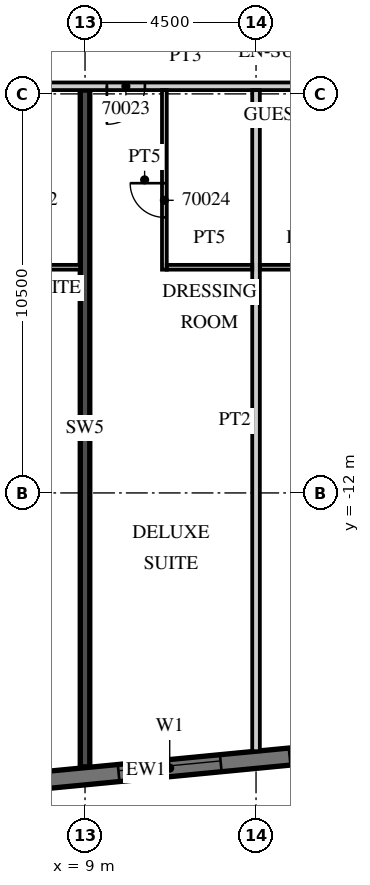
"""IFC4 building model, lengths in metres.
Left out: names, types, materials, properties, quantities, classifications, styles, units other than length and angle.
Written with IfcOpenShell. Run it as: python <this file> out.ifc"""

import sys

from ifc_helpers import new_model, si_unit, direction, frame, frame_2d, origin, place, context, subcontext, project, spatial, rectangle, extrude, element, fill, save


model = new_model("IFC4")
c1 = context("Model", 3, precision=1e-05, world=origin(), true_north=direction((0.0, 1.0)))
c2 = subcontext(c1, "Body", "Model", "MODEL_VIEW")
j1 = project(units=[si_unit("LENGTHUNIT", "METRE"), si_unit("PLANEANGLEUNIT", "RADIAN")], contexts=[c1])
p1 = place(None, origin())
s1 = spatial("IfcSite", under=j1, at=p1, CompositionType="ELEMENT")
p2 = place(p1, origin())
s2 = spatial("IfcBuilding", under=s1, at=p2, CompositionType="ELEMENT")
p3 = place(p2, frame((0.0, 0.0, 281.7)))
s3 = spatial("IfcBuildingStorey", under=s2, at=p3, CompositionType="ELEMENT", Elevation=281.7)
p4 = place(p3, frame((9.0, -19.207, 0.0), z_axis=(0.0, 0.0, 1.0), x_axis=(0.0, 1.0, 0.0)))
e1 = element("IfcWall", 1, at=p4, inside=s3, PredefinedType="SHEAR", context=c2, shape_type="SweptSolid", body=[
    extrude(rectangle(XDim=17.807, YDim=0.25, at=frame_2d((8.904, 0.0))), origin(), (0.0, 0.0, 1.0), 3.3),
])
p5 = place(p3, frame((-13.521, -21.624, 0.0), z_axis=(0.0, 0.0, 1.0), x_axis=(0.995396186218, 0.095845878695, 0.0)))
e2 = element("IfcWall", 2, at=p5, inside=s3, PredefinedType="SOLIDWALL", context=c2, shape_type="SweptSolid", body=[
    extrude(rectangle(XDim=48.481, YDim=0.45, at=frame_2d((24.241, 0.0))), origin(), (0.0, 0.0, 1.0), 3.02),
])
p6 = place(p5, frame((0.91, 0.0, 0.45)))
e3 = element("IfcOpeningElement", 3, at=p6, cuts=e2, PredefinedType="OPENING", context=c2, shape_type="SweptSolid", body=[
    extrude(rectangle(XDim=2.7, YDim=2.25, at=frame_2d((1.35, 1.125))), frame((0.0, 0.235, 0.0), z_axis=(0.0, -1.0, 0.0), x_axis=(1.0, 0.0, 0.0)), (0.0, 0.0, 1.0), 0.47),
])
p7 = place(p5, frame((5.431, 0.0, 0.45)))
e4 = element("IfcOpeningElement", 4, at=p7, cuts=e2, PredefinedType="OPENING", context=c2, shape_type="SweptSolid", body=[
    extrude(rectangle(XDim=2.7, YDim=2.25, at=frame_2d((1.35, 1.125))), frame((0.0, 0.235, 0.0), z_axis=(0.0, -1.0, 0.0), x_axis=(1.0, 0.0, 0.0)), (0.0, 0.0, 1.0), 0.47),
])
p8 = place(p5, frame((9.952, 0.0, 0.45)))
e5 = element("IfcOpeningElement", 5, at=p8, cuts=e2, PredefinedType="OPENING", context=c2, shape_type="SweptSolid", body=[
    extrude(rectangle(XDim=2.7, YDim=2.25, at=frame_2d((1.35, 1.125))), frame((0.0, 0.235, 0.0), z_axis=(0.0, -1.0, 0.0), x_axis=(1.0, 0.0, 0.0)), (0.0, 0.0, 1.0), 0.47),
])
p9 = place(p5, frame((14.473, 0.0, 0.45)))
e6 = element("IfcOpeningElement", 6, at=p9, cuts=e2, PredefinedType="OPENING", context=c2, shape_type="SweptSolid", body=[
    extrude(rectangle(XDim=2.7, YDim=2.25, at=frame_2d((1.35, 1.125))), frame((0.0, 0.235, 0.0), z_axis=(0.0, -1.0, 0.0), x_axis=(1.0, 0.0, 0.0)), (0.0, 0.0, 1.0), 0.47),
])
p10 = place(p5, frame((18.994, 0.0, 0.45)))
e7 = element("IfcOpeningElement", 7, at=p10, cuts=e2, PredefinedType="OPENING", context=c2, shape_type="SweptSolid", body=[
    extrude(rectangle(XDim=2.7, YDim=2.25, at=frame_2d((1.35, 1.125))), frame((0.0, 0.235, 0.0), z_axis=(0.0, -1.0, 0.0), x_axis=(1.0, 0.0, 0.0)), (0.0, 0.0, 1.0), 0.47),
])
p11 = place(p5, frame((23.514, 0.0, 0.45)))
e8 = element("IfcOpeningElement", 8, at=p11, cuts=e2, PredefinedType="OPENING", context=c2, shape_type="SweptSolid", body=[
    extrude(rectangle(XDim=2.7, YDim=2.25, at=frame_2d((1.35, 1.125))), frame((0.0, 0.235, 0.0), z_axis=(0.0, -1.0, 0.0), x_axis=(1.0, 0.0, 0.0)), (0.0, 0.0, 1.0), 0.47),
])
p12 = place(p5, frame((28.035, 0.0, 0.45)))
e9 = element("IfcOpeningElement", 9, at=p12, cuts=e2, PredefinedType="OPENING", context=c2, shape_type="SweptSolid", body=[
    extrude(rectangle(XDim=2.7, YDim=2.25, at=frame_2d((1.35, 1.125))), frame((0.0, 0.235, 0.0), z_axis=(0.0, -1.0, 0.0), x_axis=(1.0, 0.0, 0.0)), (0.0, 0.0, 1.0), 0.47),
])
p13 = place(p5, frame((32.556, 0.0, 0.45)))
e10 = element("IfcOpeningElement", 10, at=p13, cuts=e2, PredefinedType="OPENING", context=c2, shape_type="SweptSolid", body=[
    extrude(rectangle(XDim=2.7, YDim=2.25, at=frame_2d((1.35, 1.125))), frame((0.0, 0.235, 0.0), z_axis=(0.0, -1.0, 0.0), x_axis=(1.0, 0.0, 0.0)), (0.0, 0.0, 1.0), 0.47),
])
p14 = place(p5, frame((37.077, 0.0, 0.45)))
e11 = element("IfcOpeningElement", 11, at=p14, cuts=e2, PredefinedType="OPENING", context=c2, shape_type="SweptSolid", body=[
    extrude(rectangle(XDim=2.7, YDim=2.25, at=frame_2d((1.35, 1.125))), frame((0.0, 0.235, 0.0), z_axis=(0.0, -1.0, 0.0), x_axis=(1.0, 0.0, 0.0)), (0.0, 0.0, 1.0), 0.47),
])
p15 = place(p5, frame((41.598, 0.0, 0.45)))
e12 = element("IfcOpeningElement", 12, at=p15, cuts=e2, PredefinedType="OPENING", context=c2, shape_type="SweptSolid", body=[
    extrude(rectangle(XDim=2.7, YDim=2.25, at=frame_2d((1.35, 1.125))), frame((0.0, 0.235, 0.0), z_axis=(0.0, -1.0, 0.0), x_axis=(1.0, 0.0, 0.0)), (0.0, 0.0, 1.0), 0.47),
])
p16 = place(p3, frame((-13.5, -1.3, 0.0), z_axis=(0.0, 0.0, 1.0), x_axis=(1.0, 0.0, 0.0)))
e13 = element("IfcWall", 13, at=p16, inside=s3, PredefinedType="PARTITIONING", context=c2, shape_type="SweptSolid", body=[
    extrude(rectangle(XDim=50.293, YDim=0.2, at=frame_2d((25.146, 0.0))), origin(), (0.0, 0.0, 1.0), 3.02),
])
p17 = place(p16, frame((2.925, 0.0, 0.0)))
e14 = element("IfcOpeningElement", 14, at=p17, cuts=e13, PredefinedType="OPENING", context=c2, shape_type="SweptSolid", body=[
    extrude(rectangle(XDim=1.0, YDim=2.1, at=frame_2d((0.5, 1.05))), frame((0.0, 0.11, 0.0), z_axis=(0.0, -1.0, 0.0), x_axis=(1.0, 0.0, 0.0)), (0.0, 0.0, 1.0), 0.22),
])
p18 = place(p16, frame((6.938, 0.0, 0.0)))
e15 = element("IfcOpeningElement", 15, at=p18, cuts=e13, PredefinedType="OPENING", context=c2, shape_type="SweptSolid", body=[
    extrude(rectangle(XDim=1.2, YDim=2.1, at=frame_2d((0.6, 1.05))), frame((0.0, 0.11, 0.0), z_axis=(0.0, -1.0, 0.0), x_axis=(1.0, 0.0, 0.0)), (0.0, 0.0, 1.0), 0.22),
])
p19 = place(p16, frame((14.075, 0.0, 0.0)))
e16 = element("IfcOpeningElement", 16, at=p19, cuts=e13, PredefinedType="OPENING", context=c2, shape_type="SweptSolid", body=[
    extrude(rectangle(XDim=1.0, YDim=2.1, at=frame_2d((0.5, 1.05))), frame((0.0, 0.11, 0.0), z_axis=(0.0, -1.0, 0.0), x_axis=(1.0, 0.0, 0.0)), (0.0, 0.0, 1.0), 0.22),
])
p20 = place(p16, frame((18.55, 0.0, 0.0)))
e17 = element("IfcOpeningElement", 17, at=p20, cuts=e13, PredefinedType="OPENING", context=c2, shape_type="SweptSolid", body=[
    extrude(rectangle(XDim=1.0, YDim=2.1, at=frame_2d((0.5, 1.05))), frame((0.0, 0.11, 0.0), z_axis=(0.0, -1.0, 0.0), x_axis=(1.0, 0.0, 0.0)), (0.0, 0.0, 1.0), 0.22),
])
p21 = place(p16, frame((23.075, 0.0, 0.0)))
e18 = element("IfcOpeningElement", 18, at=p21, cuts=e13, PredefinedType="OPENING", context=c2, shape_type="SweptSolid", body=[
    extrude(rectangle(XDim=1.0, YDim=2.1, at=frame_2d((0.5, 1.05))), frame((0.0, 0.11, 0.0), z_axis=(0.0, -1.0, 0.0), x_axis=(1.0, 0.0, 0.0)), (0.0, 0.0, 1.0), 0.22),
])
p22 = place(p16, frame((29.925, 0.0, 0.0)))
e19 = element("IfcOpeningElement", 19, at=p22, cuts=e13, PredefinedType="OPENING", context=c2, shape_type="SweptSolid", body=[
    extrude(rectangle(XDim=1.0, YDim=2.1, at=frame_2d((0.5, 1.05))), frame((0.0, 0.11, 0.0), z_axis=(0.0, -1.0, 0.0), x_axis=(1.0, 0.0, 0.0)), (0.0, 0.0, 1.0), 0.22),
])
p23 = place(p16, frame((32.075, 0.0, 0.0)))
e20 = element("IfcOpeningElement", 20, at=p23, cuts=e13, PredefinedType="OPENING", context=c2, shape_type="SweptSolid", body=[
    extrude(rectangle(XDim=1.0, YDim=2.1, at=frame_2d((0.5, 1.05))), frame((0.0, 0.11, 0.0), z_axis=(0.0, -1.0, 0.0), x_axis=(1.0, 0.0, 0.0)), (0.0, 0.0, 1.0), 0.22),
])
p24 = place(p16, frame((36.55, 0.0, 0.0)))
e21 = element("IfcOpeningElement", 21, at=p24, cuts=e13, PredefinedType="OPENING", context=c2, shape_type="SweptSolid", body=[
    extrude(rectangle(XDim=1.0, YDim=2.1, at=frame_2d((0.5, 1.05))), frame((0.0, 0.11, 0.0), z_axis=(0.0, -1.0, 0.0), x_axis=(1.0, 0.0, 0.0)), (0.0, 0.0, 1.0), 0.22),
])
p25 = place(p16, frame((42.938, 0.0, 0.0)))
e22 = element("IfcOpeningElement", 22, at=p25, cuts=e13, PredefinedType="OPENING", context=c2, shape_type="SweptSolid", body=[
    extrude(rectangle(XDim=1.2, YDim=2.1, at=frame_2d((0.6, 1.05))), frame((0.0, 0.11, 0.0), z_axis=(0.0, -1.0, 0.0), x_axis=(1.0, 0.0, 0.0)), (0.0, 0.0, 1.0), 0.22),
])
p26 = place(p3, frame((6.625, -6.062, 0.0), z_axis=(0.0, 0.0, 1.0), x_axis=(1.0, 0.0, 0.0)))
e23 = element("IfcWall", 23, at=p26, inside=s3, PredefinedType="PARTITIONING", context=c2, shape_type="SweptSolid", body=[
    extrude(rectangle(XDim=2.25, YDim=0.125, at=frame_2d((1.125, 0.0))), origin(), (0.0, 0.0, 1.0), 3.02),
])
p27 = place(p3, frame((13.5, -18.796, 0.0), z_axis=(0.0, 0.0, 1.0), x_axis=(0.0, 1.0, 0.0)))
e24 = element("IfcWall", 24, at=p27, inside=s3, PredefinedType="PARTITIONING", context=c2, shape_type="SweptSolid", body=[
    extrude(rectangle(XDim=17.396, YDim=0.2, at=frame_2d((8.698, 0.0))), origin(), (0.0, 0.0, 1.0), 3.02),
])
p28 = place(p3, frame((11.088, -6.125, 0.0), z_axis=(0.0, 0.0, 1.0), x_axis=(0.0, 1.0, 0.0)))
e25 = element("IfcWall", 25, at=p28, inside=s3, PredefinedType="PARTITIONING", context=c2, shape_type="SweptSolid", body=[
    extrude(rectangle(XDim=4.725, YDim=0.125, at=frame_2d((2.363, 0.0))), origin(), (0.0, 0.0, 1.0), 3.02),
])
p29 = place(p28, frame((1.375, 0.0, 0.0)))
e26 = element("IfcOpeningElement", 26, at=p29, cuts=e25, PredefinedType="OPENING", context=c2, shape_type="SweptSolid", body=[
    extrude(rectangle(XDim=0.9, YDim=2.1, at=frame_2d((0.45, 1.05))), frame((0.0, 0.073, 0.0), z_axis=(0.0, -1.0, 0.0), x_axis=(1.0, 0.0, 0.0)), (0.0, 0.0, 1.0), 0.145),
])
for number, where, z_axis, x_axis in (
    (27, (11.15, -6.062, 0.0), (0.0, 0.0, 1.0), (1.0, 0.0, 0.0)),
    (28, (13.6, -6.062, 0.0), (0.0, 0.0, 1.0), (1.0, 0.0, 0.0)),
):
    element("IfcWall", number, at=place(p3, frame(where, z_axis=z_axis, x_axis=x_axis)), inside=s3, PredefinedType="PARTITIONING", context=c2, shape_type="SweptSolid", body=[
        extrude(rectangle(XDim=2.25, YDim=0.125, at=frame_2d((1.125, 0.0))), origin(), (0.0, 0.0, 1.0), 3.02),
    ])
p30 = place(p11, origin())
e29 = element("IfcWindow", 29, at=p30, inside=s3, PartitioningType="SINGLE_PANEL", PredefinedType="WINDOW", context=c2, shape_type="SweptSolid", body=[
    extrude(rectangle(XDim=2.7, YDim=2.25, at=frame_2d((1.35, 1.125))), frame((0.0, 0.09, 0.0), z_axis=(0.0, -1.0, 0.0), x_axis=(1.0, 0.0, 0.0)), (0.0, 0.0, 1.0), 0.06),
])
fill(e8, e29)
p31 = place(p12, origin())
e30 = element("IfcWindow", 30, at=p31, inside=s3, PartitioningType="SINGLE_PANEL", PredefinedType="WINDOW", context=c2, shape_type="SweptSolid", body=[
    extrude(rectangle(XDim=2.7, YDim=2.25, at=frame_2d((1.35, 1.125))), frame((0.0, 0.09, 0.0), z_axis=(0.0, -1.0, 0.0), x_axis=(1.0, 0.0, 0.0)), (0.0, 0.0, 1.0), 0.06),
])
fill(e9, e30)
p32 = place(p21, origin())
e31 = element("IfcDoor", 31, at=p32, inside=s3, OperationType="SINGLE_SWING_LEFT", PredefinedType="DOOR", context=c2, shape_type="SweptSolid", body=[
    extrude(rectangle(XDim=1.0, YDim=2.1, at=frame_2d((0.5, 1.05))), frame((0.0, 0.025, 0.0), z_axis=(0.0, -1.0, 0.0), x_axis=(1.0, 0.0, 0.0)), (0.0, 0.0, 1.0), 0.05),
])
fill(e18, e31)
p33 = place(p29, origin())
e32 = element("IfcDoor", 32, at=p33, inside=s3, OperationType="SINGLE_SWING_RIGHT", PredefinedType="DOOR", context=c2, shape_type="SweptSolid", body=[
    extrude(rectangle(XDim=0.9, YDim=2.1, at=frame_2d((0.45, 1.05))), frame((0.0, 0.025, 0.0), z_axis=(0.0, -1.0, 0.0), x_axis=(1.0, 0.0, 0.0)), (0.0, 0.0, 1.0), 0.05),
])
fill(e26, e32)
save(model, sys.argv[1])
